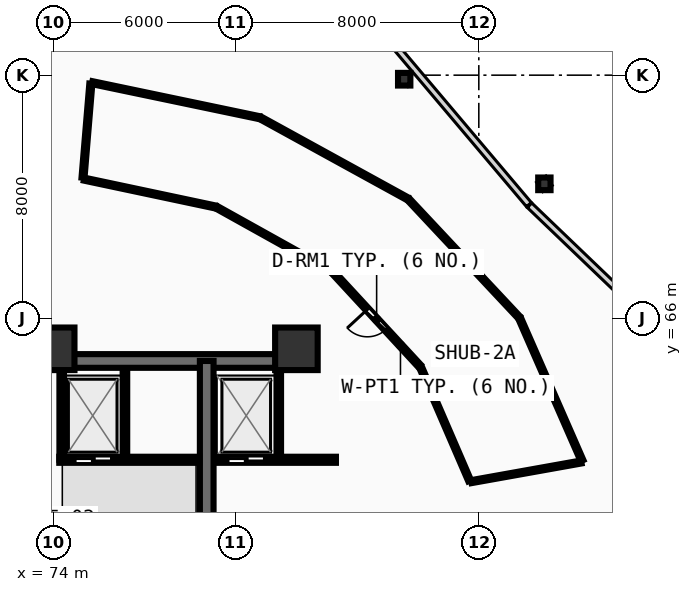
"""IFC4 building model, lengths in metres.
Left out: names, types, materials, properties, quantities, classifications, styles, units other than length and angle.
Written with IfcOpenShell. Run it as: python <this file> out.ifc"""

import sys

from ifc_helpers import new_model, si_unit, direction, frame, frame_2d, origin, origin_2d, place, context, subcontext, project, spatial, rectangle, i_section, extrude, element, fill, save


model = new_model("IFC4")
c1 = context("Model", 3, precision=1e-05, world=origin(), true_north=direction((0.0, 1.0)))
c2 = subcontext(c1, "Body", "Model", "MODEL_VIEW")
j1 = project(units=[si_unit("LENGTHUNIT", "METRE"), si_unit("PLANEANGLEUNIT", "RADIAN")], contexts=[c1])
p1 = place(None, origin())
s1 = spatial("IfcSite", under=j1, at=p1, CompositionType="ELEMENT")
p2 = place(p1, origin())
s2 = spatial("IfcBuilding", under=s1, at=p2, CompositionType="ELEMENT")
p3 = place(p2, frame((0.0, 0.0, 9.0)))
s3 = spatial("IfcBuildingStorey", under=s2, at=p3, CompositionType="ELEMENT", Elevation=9.0)
for number, where, z_axis, x_axis in (
    (1, (82.0, 65.0, 0.0), (0.0, 0.0, 1.0), (1.0, 0.0, 0.0)),
    (2, (74.0, 65.0, 0.0), (0.0, 0.0, 1.0), (1.0, 0.0, 0.0)),
):
    element("IfcColumn", number, at=place(p3, frame(where, z_axis=z_axis, x_axis=x_axis)), inside=s3, PredefinedType="PILASTER", context=c2, shape_type="SweptSolid", body=[
        extrude(rectangle(XDim=1.4, YDim=1.4, at=origin_2d()), origin(), (0.0, 0.0, 1.0), 4.5),
    ])
for number, where, z_axis, x_axis in (
    (3, (90.156, 70.426, 0.0), (0.0, 0.0, 1.0), (1.0, 0.0, 0.0)),
    (4, (85.546, 73.866, 0.0), (0.0, 0.0, 1.0), (1.0, 0.0, 0.0)),
):
    element("IfcColumn", number, at=place(p3, frame(where, z_axis=z_axis, x_axis=x_axis)), inside=s3, PredefinedType="COLUMN", context=c2, shape_type="SweptSolid", body=[
        extrude(i_section(OverallWidth=0.406, OverallDepth=0.416, WebThickness=0.029, FlangeThickness=0.048, FilletRadius=0.015, at=origin_2d()), origin(), (0.0, 0.0, 1.0), 4.5),
    ])
p4 = place(p3, frame((74.0, 64.6, 0.0), z_axis=(0.0, 0.0, 1.0), x_axis=(1.0, 0.0, 0.0)))
e5 = element("IfcWall", 5, at=p4, inside=s3, PredefinedType="SHEAR", context=c2, shape_type="SweptSolid", body=[
    extrude(rectangle(XDim=8.0, YDim=0.45, at=frame_2d((4.0, 0.0))), origin(), (0.0, 0.0, 1.0), 4.1),
])
p5 = place(p3, frame((79.05, 58.3, 0.0), z_axis=(0.0, 0.0, 1.0), x_axis=(0.0, 1.0, 0.0)))
e6 = element("IfcWall", 6, at=p5, inside=s3, PredefinedType="SHEAR", context=c2, shape_type="SweptSolid", body=[
    extrude(rectangle(XDim=6.3, YDim=0.45, at=frame_2d((3.15, 0.0))), origin(), (0.0, 0.0, 1.0), 4.1),
])
p6 = place(p3, frame((74.2, 61.35, 0.0), z_axis=(0.0, 0.0, 1.0), x_axis=(1.0, 0.0, 0.0)))
e7 = element("IfcWall", 7, at=p6, inside=s3, PredefinedType="SOLIDWALL", context=c2, shape_type="SweptSolid", body=[
    extrude(rectangle(XDim=4.6, YDim=0.2, at=frame_2d((2.3, 0.0))), origin(), (0.0, 0.0, 1.0), 4.09),
])
p7 = place(p6, frame((0.52, 0.0, 0.0)))
e8 = element("IfcOpeningElement", 8, at=p7, cuts=e7, PredefinedType="OPENING", context=c2, shape_type="SweptSolid", body=[
    extrude(rectangle(XDim=1.2, YDim=2.15, at=frame_2d((0.6, 1.075))), frame((0.0, 0.11, 0.0), z_axis=(0.0, -1.0, 0.0), x_axis=(1.0, 0.0, 0.0)), (0.0, 0.0, 1.0), 0.22),
])
p8 = place(p3, frame((74.28, 61.35, 0.0), z_axis=(0.0, 0.0, 1.0), x_axis=(0.0, 1.0, 0.0)))
e9 = element("IfcWall", 9, at=p8, inside=s3, PredefinedType="PARTITIONING", context=c2, shape_type="SweptSolid", body=[
    extrude(rectangle(XDim=2.97, YDim=0.15, at=frame_2d((1.485, 0.0))), origin(), (0.0, 0.0, 1.0), 4.09),
])
p9 = place(p3, frame((76.36, 61.48, 0.0), z_axis=(0.0, 0.0, 1.0), x_axis=(0.0, 1.0, 0.0)))
e10 = element("IfcWall", 10, at=p9, inside=s3, PredefinedType="PARTITIONING", context=c2, shape_type="SweptSolid", body=[
    extrude(rectangle(XDim=2.84, YDim=0.15, at=frame_2d((1.42, 0.0))), origin(), (0.0, 0.0, 1.0), 4.09),
])
p10 = place(p3, frame((79.3, 61.35, 0.0), z_axis=(0.0, 0.0, 1.0), x_axis=(1.0, 0.0, 0.0)))
e11 = element("IfcWall", 11, at=p10, inside=s3, PredefinedType="SOLIDWALL", context=c2, shape_type="SweptSolid", body=[
    extrude(rectangle(XDim=4.0, YDim=0.2, at=frame_2d((2.0, 0.0))), origin(), (0.0, 0.0, 1.0), 3.385),
])
p11 = place(p10, frame((0.45, 0.0, 0.0)))
e12 = element("IfcOpeningElement", 12, at=p11, cuts=e11, PredefinedType="OPENING", context=c2, shape_type="SweptSolid", body=[
    extrude(rectangle(XDim=1.2, YDim=2.15, at=frame_2d((0.6, 1.075))), frame((0.0, 0.11, 0.0), z_axis=(0.0, -1.0, 0.0), x_axis=(1.0, 0.0, 0.0)), (0.0, 0.0, 1.0), 0.22),
])
p12 = place(p3, frame((81.42, 61.48, 0.0), z_axis=(0.0, 0.0, 1.0), x_axis=(0.0, 1.0, 0.0)))
e13 = element("IfcWall", 13, at=p12, inside=s3, PredefinedType="PARTITIONING", context=c2, shape_type="SweptSolid", body=[
    extrude(rectangle(XDim=2.84, YDim=0.15, at=frame_2d((1.42, 0.0))), origin(), (0.0, 0.0, 1.0), 4.09),
])
p13 = place(p3, frame((86.039, 64.449, 0.0), z_axis=(0.0, 0.0, 1.0), x_axis=(-0.678660886428, 0.734451769167, 0.0)))
e14 = element("IfcWall", 14, at=p13, inside=s3, PredefinedType="PARTITIONING", context=c2, shape_type="SweptSolid", body=[
    extrude(rectangle(XDim=4.126, YDim=0.12, at=frame_2d((2.063, 0.0))), origin(), (0.0, 0.0, 1.0), 3.485),
])
p14 = place(p13, frame((1.613, 0.0, 0.0)))
e15 = element("IfcOpeningElement", 15, at=p14, cuts=e14, PredefinedType="OPENING", context=c2, shape_type="SweptSolid", body=[
    extrude(rectangle(XDim=0.9, YDim=2.08, at=frame_2d((0.45, 1.04))), frame((0.0, 0.07, 0.0), z_axis=(0.0, -1.0, 0.0), x_axis=(1.0, 0.0, 0.0)), (0.0, 0.0, 1.0), 0.14),
])
p15 = place(p3, frame((87.698, 60.661, 0.0), z_axis=(0.0, 0.0, 1.0), x_axis=(-0.396638629538, 0.917974834927, 0.0)))
e16 = element("IfcWall", 16, at=p15, inside=s3, PredefinedType="PARTITIONING", context=c2, shape_type="SweptSolid", body=[
    extrude(rectangle(XDim=4.039, YDim=0.1, at=frame_2d((2.02, 0.0))), origin(), (0.0, 0.0, 1.0), 4.09),
])
p16 = place(p3, frame((83.163, 67.543, 0.0), z_axis=(0.0, 0.0, 1.0), x_axis=(-0.873635441336, 0.486581047351, 0.0)))
e17 = element("IfcWall", 17, at=p16, inside=s3, PredefinedType="PARTITIONING", context=c2, shape_type="SweptSolid", body=[
    extrude(rectangle(XDim=4.308, YDim=0.1, at=frame_2d((2.154, 0.0))), origin(), (0.0, 0.0, 1.0), 3.485),
])
p17 = place(p3, frame((79.326, 69.667, 0.0), z_axis=(0.0, 0.0, 1.0), x_axis=(-0.978253554802, 0.207412590066, 0.0)))
e18 = element("IfcWall", 18, at=p17, inside=s3, PredefinedType="PARTITIONING", context=c2, shape_type="SweptSolid", body=[
    extrude(rectangle(XDim=4.405, YDim=0.1, at=frame_2d((2.202, 0.0))), origin(), (0.0, 0.0, 1.0), 4.09),
])
p18 = place(p3, frame((74.981, 70.629, 0.0), z_axis=(0.0, 0.0, 1.0), x_axis=(0.082980386384, 0.99655118056, 0.0)))
e19 = element("IfcWall", 19, at=p18, inside=s3, PredefinedType="PARTITIONING", context=c2, shape_type="SweptSolid", body=[
    extrude(rectangle(XDim=3.104, YDim=0.1, at=frame_2d((1.552, 0.0))), origin(), (0.0, 0.0, 1.0), 3.845),
])
p19 = place(p3, frame((75.281, 73.754, 0.0), z_axis=(0.0, 0.0, 1.0), x_axis=(0.978815375129, -0.20474486907, 0.0)))
e20 = element("IfcWall", 20, at=p19, inside=s3, PredefinedType="PARTITIONING", context=c2, shape_type="SweptSolid", body=[
    extrude(rectangle(XDim=5.61, YDim=0.1, at=frame_2d((2.805, 0.0))), origin(), (0.0, 0.0, 1.0), 3.485),
])
p20 = place(p3, frame((80.847, 72.578, 0.0), z_axis=(0.0, 0.0, 1.0), x_axis=(0.876472970491, -0.481451069164, 0.0)))
e21 = element("IfcWall", 21, at=p20, inside=s3, PredefinedType="PARTITIONING", context=c2, shape_type="SweptSolid", body=[
    extrude(rectangle(XDim=5.471, YDim=0.1, at=frame_2d((2.736, 0.0))), origin(), (0.0, 0.0, 1.0), 3.485),
])
p21 = place(p3, frame((85.705, 69.895, 0.0), z_axis=(0.0, 0.0, 1.0), x_axis=(0.683762404443, -0.729704717177, 0.0)))
e22 = element("IfcWall", 22, at=p21, inside=s3, PredefinedType="PARTITIONING", context=c2, shape_type="SweptSolid", body=[
    extrude(rectangle(XDim=5.271, YDim=0.1, at=frame_2d((2.636, 0.0))), origin(), (0.0, 0.0, 1.0), 3.485),
])
p22 = place(p3, frame((89.353, 65.982, 0.0), z_axis=(0.0, 0.0, 1.0), x_axis=(0.40128943914, -0.915951301126, 0.0)))
e23 = element("IfcWall", 23, at=p22, inside=s3, PredefinedType="PARTITIONING", context=c2, shape_type="SweptSolid", body=[
    extrude(rectangle(XDim=5.089, YDim=0.1, at=frame_2d((2.544, 0.0))), origin(), (0.0, 0.0, 1.0), 3.485),
])
p23 = place(p3, frame((91.372, 61.278, 0.0), z_axis=(0.0, 0.0, 1.0), x_axis=(-0.98438649623, -0.176020527328, 0.0)))
e24 = element("IfcWall", 24, at=p23, inside=s3, PredefinedType="PARTITIONING", context=c2, shape_type="SweptSolid", body=[
    extrude(rectangle(XDim=3.676, YDim=0.1, at=frame_2d((1.838, 0.0))), origin(), (0.0, 0.0, 1.0), 4.09),
])
p24 = place(p7, origin())
e25 = element("IfcDoor", 25, at=p24, inside=s3, OperationType="DOUBLE_DOOR_SLIDING", PredefinedType="DOOR", context=c2, shape_type="SweptSolid", body=[
    extrude(rectangle(XDim=1.2, YDim=2.15, at=frame_2d((0.6, 1.075))), frame((0.0, 0.025, 0.0), z_axis=(0.0, -1.0, 0.0), x_axis=(1.0, 0.0, 0.0)), (0.0, 0.0, 1.0), 0.05),
])
fill(e8, e25)
p25 = place(p11, origin())
e26 = element("IfcDoor", 26, at=p25, inside=s3, OperationType="DOUBLE_DOOR_SLIDING", PredefinedType="DOOR", context=c2, shape_type="SweptSolid", body=[
    extrude(rectangle(XDim=1.2, YDim=2.15, at=frame_2d((0.6, 1.075))), frame((0.0, 0.025, 0.0), z_axis=(0.0, -1.0, 0.0), x_axis=(1.0, 0.0, 0.0)), (0.0, 0.0, 1.0), 0.05),
])
fill(e12, e26)
p26 = place(p14, origin())
e27 = element("IfcDoor", 27, at=p26, inside=s3, OperationType="SINGLE_SWING_RIGHT", PredefinedType="DOOR", context=c2, shape_type="SweptSolid", body=[
    extrude(rectangle(XDim=0.9, YDim=2.08, at=frame_2d((0.45, 1.04))), frame((0.0, 0.025, 0.0), z_axis=(0.0, -1.0, 0.0), x_axis=(1.0, 0.0, 0.0)), (0.0, 0.0, 1.0), 0.05),
])
fill(e15, e27)
save(model, sys.argv[1])
